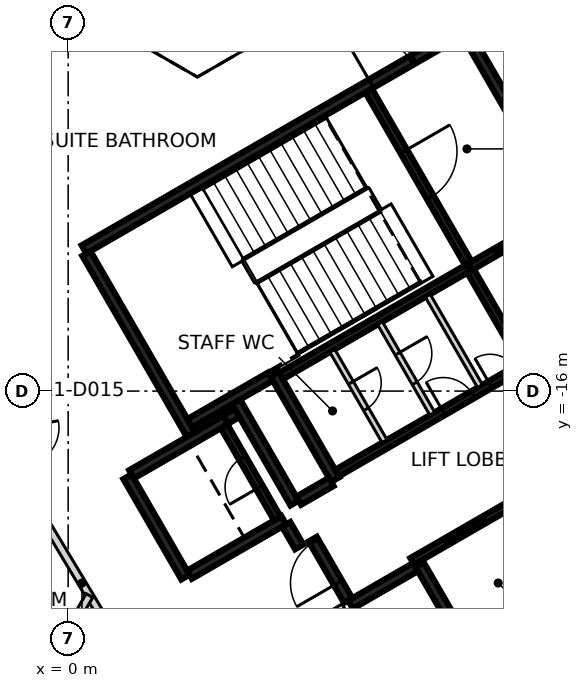
"""IFC4 building model, lengths in metres.
Left out: names, types, materials, properties, quantities, classifications, styles, units other than length and angle.
Written with IfcOpenShell. Run it as: python <this file> out.ifc"""

import sys

from ifc_helpers import new_model, si_unit, direction, frame, frame_2d, origin, place, context, subcontext, project, spatial, rectangle, extrude, element, fill, save


model = new_model("IFC4")
c1 = context("Model", 3, precision=1e-05, world=origin(), true_north=direction((0.0, 1.0)))
c2 = subcontext(c1, "Body", "Model", "MODEL_VIEW")
j1 = project(units=[si_unit("LENGTHUNIT", "METRE"), si_unit("PLANEANGLEUNIT", "RADIAN")], contexts=[c1])
p1 = place(None, origin())
s1 = spatial("IfcSite", under=j1, at=p1, CompositionType="ELEMENT")
p2 = place(p1, origin())
s2 = spatial("IfcBuilding", under=s1, at=p2, CompositionType="ELEMENT")
p3 = place(p2, frame((0.0, 0.0, 53.0)))
s3 = spatial("IfcBuildingStorey", under=s2, at=p3, CompositionType="ELEMENT", Elevation=53.0)
p4 = place(p3, frame((0.417, -12.273, 0.0), z_axis=(0.0, 0.0, 1.0), x_axis=(0.866021906294, 0.500006057782, 0.0)))
e1 = element("IfcWall", 1, at=p4, inside=s3, PredefinedType="SHEAR", context=c2, shape_type="SweptSolid", body=[
    extrude(rectangle(XDim=11.55, YDim=0.25, at=frame_2d((5.775, 0.0))), origin(), (0.0, 0.0, 1.0), 3.125),
])
p5 = place(p4, frame((10.025, 0.0, 0.0)))
e2 = element("IfcOpeningElement", 2, at=p5, cuts=e1, PredefinedType="OPENING", context=c2, shape_type="SweptSolid", body=[
    extrude(rectangle(XDim=1.2, YDim=2.1, at=frame_2d((0.6, 1.05))), frame((0.0, 0.135, 0.0), z_axis=(0.0, -1.0, 0.0), x_axis=(1.0, 0.0, 0.0)), (0.0, 0.0, 1.0), 0.27),
])
p6 = place(p4, frame((8.725, 0.0, 0.0)))
e3 = element("IfcOpeningElement", 3, at=p6, cuts=e1, PredefinedType="OPENING", context=c2, shape_type="SweptSolid", body=[
    extrude(rectangle(XDim=1.2, YDim=2.1, at=frame_2d((0.6, 1.05))), frame((0.0, 0.135, 0.0), z_axis=(0.0, -1.0, 0.0), x_axis=(1.0, 0.0, 0.0)), (0.0, 0.0, 1.0), 0.27),
])
p7 = place(p3, frame((15.865, -20.328, 0.0), z_axis=(0.0, 0.0, 1.0), x_axis=(-0.86602852612, -0.499994591916, 0.0)))
e4 = element("IfcWall", 4, at=p7, inside=s3, PredefinedType="SHEAR", context=c2, shape_type="SweptSolid", body=[
    extrude(rectangle(XDim=5.85, YDim=0.25, at=frame_2d((2.925, 0.0))), origin(), (0.0, 0.0, 1.0), 3.125),
])
p8 = place(p3, frame((3.235, -17.153, 0.0), z_axis=(0.0, 0.0, 1.0), x_axis=(-0.500008851346, 0.866020293397, 0.0)))
e5 = element("IfcWall", 5, at=p8, inside=s3, PredefinedType="SHEAR", context=c2, shape_type="SweptSolid", body=[
    extrude(rectangle(XDim=5.51, YDim=0.25, at=frame_2d((2.755, 0.0))), origin(), (0.0, 0.0, 1.0), 3.125),
])
p9 = place(p3, frame((10.483, -6.606, 0.0), z_axis=(0.0, 0.0, 1.0), x_axis=(0.49999885962, -0.866026062182, 0.0)))
e6 = element("IfcWall", 6, at=p9, inside=s3, PredefinedType="SHEAR", context=c2, shape_type="SweptSolid", body=[
    extrude(rectangle(XDim=5.225, YDim=0.25, at=frame_2d((2.612, 0.0))), origin(), (0.0, 0.0, 1.0), 3.125),
])
p10 = place(p9, frame((1.95, 0.0, 0.0)))
e7 = element("IfcOpeningElement", 7, at=p10, cuts=e6, PredefinedType="OPENING", context=c2, shape_type="SweptSolid", body=[
    extrude(rectangle(XDim=1.2, YDim=2.1, at=frame_2d((0.6, 1.05))), frame((0.0, 0.135, 0.0), z_axis=(0.0, -1.0, 0.0), x_axis=(1.0, 0.0, 0.0)), (0.0, 0.0, 1.0), 0.27),
])
p11 = place(p3, frame((7.031, -18.327, 0.0), z_axis=(0.0, 0.0, 1.0), x_axis=(-0.499971222258, 0.866042017984, 0.0)))
e8 = element("IfcWall", 8, at=p11, inside=s3, PredefinedType="SHEAR", context=c2, shape_type="SweptSolid", body=[
    extrude(rectangle(XDim=3.2, YDim=0.25, at=frame_2d((1.6, 0.0))), origin(), (0.0, 0.0, 1.0), 3.125),
])
p12 = place(p3, frame((10.736, -23.145, 0.0), z_axis=(0.0, 0.0, 1.0), x_axis=(-0.500023226632, 0.866011993467, 0.0)))
e9 = element("IfcWall", 9, at=p12, inside=s3, PredefinedType="SHEAR", context=c2, shape_type="SweptSolid", body=[
    extrude(rectangle(XDim=2.974, YDim=0.25, at=frame_2d((1.487, 0.0))), origin(), (0.0, 0.0, 1.0), 3.125),
])
p13 = place(p3, frame((3.085, -20.894, 0.0), z_axis=(0.0, 0.0, 1.0), x_axis=(-0.499978833458, 0.866037623948, 0.0)))
e10 = element("IfcWall", 10, at=p13, inside=s3, PredefinedType="SHEAR", context=c2, shape_type="SweptSolid", body=[
    extrude(rectangle(XDim=3.05, YDim=0.25, at=frame_2d((1.525, 0.0))), origin(), (0.0, 0.0, 1.0), 3.125),
])
p14 = place(p3, frame((1.669, -18.19, 0.0), z_axis=(0.0, 0.0, 1.0), x_axis=(0.866042235819, 0.499970844928, 0.0)))
e11 = element("IfcWall", 11, at=p14, inside=s3, PredefinedType="SHEAR", context=c2, shape_type="SweptSolid", body=[
    extrude(rectangle(XDim=2.865, YDim=0.25, at=frame_2d((1.432, 0.0))), origin(), (0.0, 0.0, 1.0), 3.125),
])
p15 = place(p3, frame((5.675, -19.399, 0.0), z_axis=(0.0, 0.0, 1.0), x_axis=(-0.866026637627, -0.499997862916, 0.0)))
e12 = element("IfcWall", 12, at=p15, inside=s3, PredefinedType="SHEAR", context=c2, shape_type="SweptSolid", body=[
    extrude(rectangle(XDim=2.865, YDim=0.25, at=frame_2d((1.432, 0.0))), origin(), (0.0, 0.0, 1.0), 3.125),
])
p16 = place(p3, frame((4.414, -16.276, 0.0), z_axis=(0.0, 0.0, 1.0), x_axis=(0.500003324108, -0.866023484601, 0.0)))
e13 = element("IfcWall", 13, at=p16, inside=s3, PredefinedType="SHEAR", context=c2, shape_type="SweptSolid", body=[
    extrude(rectangle(XDim=3.085, YDim=0.25, at=frame_2d((1.542, 0.0))), origin(), (0.0, 0.0, 1.0), 3.125),
])
p17 = place(p3, frame((5.322, -15.619, 0.0), z_axis=(0.0, 0.0, 1.0), x_axis=(-0.866026229868, -0.499998569178, 0.0)))
e14 = element("IfcWall", 14, at=p17, inside=s3, PredefinedType="SHEAR", context=c2, shape_type="SweptSolid", body=[
    extrude(rectangle(XDim=2.449, YDim=0.25, at=frame_2d((1.225, 0.0))), origin(), (0.0, 0.0, 1.0), 3.125),
])
p18 = place(p3, frame((9.14, -20.631, 0.0), z_axis=(0.0, 0.0, 1.0), x_axis=(-0.866043531843, -0.499968599967, 0.0)))
e15 = element("IfcWall", 15, at=p18, inside=s3, PredefinedType="SHEAR", context=c2, shape_type="SweptSolid", body=[
    extrude(rectangle(XDim=1.975, YDim=0.25, at=frame_2d((0.987, 0.0))), origin(), (0.0, 0.0, 1.0), 3.125),
])
p19 = place(p3, frame((7.367, -21.51, 0.0), z_axis=(0.0, 0.0, 1.0), x_axis=(-0.499983108224, 0.866035156036, 0.0)))
e16 = element("IfcWall", 16, at=p19, inside=s3, PredefinedType="SHEAR", context=c2, shape_type="SweptSolid", body=[
    extrude(rectangle(XDim=1.865, YDim=0.25, at=frame_2d((0.932, 0.0))), origin(), (0.0, 0.0, 1.0), 3.125),
])
p20 = place(p19, frame((0.535, 0.0, 0.0)))
e17 = element("IfcOpeningElement", 17, at=p20, cuts=e16, PredefinedType="OPENING", context=c2, shape_type="SweptSolid", body=[
    extrude(rectangle(XDim=1.25, YDim=2.1, at=frame_2d((0.625, 1.05))), frame((0.0, 0.135, 0.0), z_axis=(0.0, -1.0, 0.0), x_axis=(1.0, 0.0, 0.0)), (0.0, 0.0, 1.0), 0.27),
])
p21 = place(p3, frame((6.065, -18.885, 0.0), z_axis=(0.0, 0.0, 1.0), x_axis=(0.866017078145, 0.500014420154, 0.0)))
e18 = element("IfcWall", 18, at=p21, inside=s3, PredefinedType="SHEAR", context=c2, shape_type="SweptSolid", body=[
    extrude(rectangle(XDim=0.989, YDim=0.25, at=frame_2d((0.495, 0.0))), origin(), (0.0, 0.0, 1.0), 3.125),
])
p22 = place(p3, frame((6.08, -20.1, 0.0), z_axis=(0.0, 0.0, 1.0), x_axis=(-0.500051773299, 0.865995510393, 0.0)))
e19 = element("IfcWall", 19, at=p22, inside=s3, PredefinedType="SHEAR", context=c2, shape_type="SweptSolid", body=[
    extrude(rectangle(XDim=0.685, YDim=0.25, at=frame_2d((0.342, 0.0))), origin(), (0.0, 0.0, 1.0), 3.125),
])
p23 = place(p3, frame((4.145, -16.749, 0.0), z_axis=(0.0, 0.0, 1.0), x_axis=(0.866185586049, 0.49972245349, 0.0)))
e20 = element("IfcWall", 20, at=p23, inside=s3, PredefinedType="SHEAR", context=c2, shape_type="SweptSolid", body=[
    extrude(rectangle(XDim=0.344, YDim=0.25, at=frame_2d((0.172, 0.0))), origin(), (0.0, 0.0, 1.0), 3.125),
])
p24 = place(p3, frame((9.052, -20.48, 0.0), z_axis=(0.0, 0.0, 1.0), x_axis=(0.866030299012, 0.499991521122, 0.0)))
e21 = element("IfcWall", 21, at=p24, inside=s3, PredefinedType="SHEAR", context=c2, shape_type="SweptSolid", body=[
    extrude(rectangle(XDim=6.1, YDim=0.2, at=frame_2d((3.05, 0.0))), origin(), (0.0, 0.0, 1.0), 3.125),
])
p25 = place(p24, frame((1.0, 0.0, 0.0)))
e22 = element("IfcOpeningElement", 22, at=p25, cuts=e21, PredefinedType="OPENING", context=c2, shape_type="SweptSolid", body=[
    extrude(rectangle(XDim=1.2, YDim=2.1, at=frame_2d((0.6, 1.05))), frame((0.0, 0.11, 0.0), z_axis=(0.0, -1.0, 0.0), x_axis=(1.0, 0.0, 0.0)), (0.0, 0.0, 1.0), 0.22),
])
p26 = place(p24, frame((4.05, 0.0, 0.0)))
e23 = element("IfcOpeningElement", 23, at=p26, cuts=e21, PredefinedType="OPENING", context=c2, shape_type="SweptSolid", body=[
    extrude(rectangle(XDim=1.2, YDim=2.1, at=frame_2d((0.6, 1.05))), frame((0.0, 0.11, 0.0), z_axis=(0.0, -1.0, 0.0), x_axis=(1.0, 0.0, 0.0)), (0.0, 0.0, 1.0), 0.22),
])
p27 = place(p3, frame((10.538, -12.752, 0.0), z_axis=(0.0, 0.0, 1.0), x_axis=(-0.866038630372, -0.499977090179, 0.0)))
e24 = element("IfcWall", 24, at=p27, inside=s3, PredefinedType="SHEAR", context=c2, shape_type="SweptSolid", body=[
    extrude(rectangle(XDim=5.699, YDim=0.2, at=frame_2d((2.85, 0.0))), origin(), (0.0, 0.0, 1.0), 3.125),
])
p28 = place(p3, frame((7.077, -18.156, 0.0), z_axis=(0.0, 0.0, 1.0), x_axis=(0.866038630372, 0.499977090179, 0.0)))
e25 = element("IfcWall", 25, at=p28, inside=s3, PredefinedType="SHEAR", context=c2, shape_type="SweptSolid", body=[
    extrude(rectangle(XDim=5.699, YDim=0.2, at=frame_2d((2.85, 0.0))), origin(), (0.0, 0.0, 1.0), 3.125),
])
p29 = place(p28, frame((3.224, 0.0, 0.0)))
e26 = element("IfcOpeningElement", 26, at=p29, cuts=e25, PredefinedType="OPENING", context=c2, shape_type="SweptSolid", body=[
    extrude(rectangle(XDim=0.9, YDim=2.1, at=frame_2d((0.45, 1.05))), frame((0.0, 0.11, 0.0), z_axis=(0.0, -1.0, 0.0), x_axis=(1.0, 0.0, 0.0)), (0.0, 0.0, 1.0), 0.22),
])
p30 = place(p28, frame((4.649, 0.0, 0.0)))
e27 = element("IfcOpeningElement", 27, at=p30, cuts=e25, PredefinedType="OPENING", context=c2, shape_type="SweptSolid", body=[
    extrude(rectangle(XDim=0.8, YDim=2.1, at=frame_2d((0.4, 1.05))), frame((0.0, 0.11, 0.0), z_axis=(0.0, -1.0, 0.0), x_axis=(1.0, 0.0, 0.0)), (0.0, 0.0, 1.0), 0.22),
])
p31 = place(p3, frame((7.906, -8.094, 0.0), z_axis=(0.0, 0.0, 1.0), x_axis=(0.500024287448, -0.866011380966, 0.0)))
e28 = element("IfcWall", 28, at=p31, inside=s3, PredefinedType="SHEAR", context=c2, shape_type="SweptSolid", body=[
    extrude(rectangle(XDim=5.251, YDim=0.2, at=frame_2d((2.625, 0.0))), origin(), (0.0, 0.0, 1.0), 3.125),
])
p32 = place(p31, frame((1.849, 0.0, 0.0)))
e29 = element("IfcOpeningElement", 29, at=p32, cuts=e28, PredefinedType="OPENING", context=c2, shape_type="SweptSolid", body=[
    extrude(rectangle(XDim=1.4, YDim=2.1, at=frame_2d((0.7, 1.05))), frame((0.0, 0.11, 0.0), z_axis=(0.0, -1.0, 0.0), x_axis=(1.0, 0.0, 0.0)), (0.0, 0.0, 1.0), 0.22),
])
p33 = place(p3, frame((5.503, -19.352, 0.0), z_axis=(0.0, 0.0, 1.0), x_axis=(-0.499986818241, 0.866033014143, 0.0)))
e30 = element("IfcWall", 30, at=p33, inside=s3, PredefinedType="SHEAR", context=c2, shape_type="SweptSolid", body=[
    extrude(rectangle(XDim=2.798, YDim=0.2, at=frame_2d((1.399, 0.0))), origin(), (0.0, 0.0, 1.0), 3.125),
])
p34 = place(p33, frame((0.949, 0.0, 0.0)))
e31 = element("IfcOpeningElement", 31, at=p34, cuts=e30, PredefinedType="OPENING", context=c2, shape_type="SweptSolid", body=[
    extrude(rectangle(XDim=0.9, YDim=2.1, at=frame_2d((0.45, 1.05))), frame((0.0, 0.11, 0.0), z_axis=(0.0, -1.0, 0.0), x_axis=(1.0, 0.0, 0.0)), (0.0, 0.0, 1.0), 0.22),
])
p35 = place(p3, frame((11.963, -15.22, 0.0), z_axis=(0.0, 0.0, 1.0), x_axis=(-0.500034990121, 0.866005201286, 0.0)))
e32 = element("IfcWall", 32, at=p35, inside=s3, PredefinedType="SHEAR", context=c2, shape_type="SweptSolid", body=[
    extrude(rectangle(XDim=2.75, YDim=0.2, at=frame_2d((1.375, 0.0))), origin(), (0.0, 0.0, 1.0), 3.125),
])
p36 = place(p3, frame((10.587, -12.723, 0.0), z_axis=(0.0, 0.0, 1.0), x_axis=(0.866037306777, 0.499979382845, 0.0)))
e33 = element("IfcWall", 33, at=p36, inside=s3, PredefinedType="SHEAR", context=c2, shape_type="SweptSolid", body=[
    extrude(rectangle(XDim=2.742, YDim=0.2, at=frame_2d((1.371, 0.0))), origin(), (0.0, 0.0, 1.0), 3.125),
])
p37 = place(p36, frame((0.743, 0.0, 0.0)))
e34 = element("IfcOpeningElement", 34, at=p37, cuts=e33, PredefinedType="OPENING", context=c2, shape_type="SweptSolid", body=[
    extrude(rectangle(XDim=1.3, YDim=2.1, at=frame_2d((0.65, 1.05))), frame((0.0, 0.11, 0.0), z_axis=(0.0, -1.0, 0.0), x_axis=(1.0, 0.0, 0.0)), (0.0, 0.0, 1.0), 0.22),
])
p38 = place(p3, frame((8.207, -14.214, 0.0), z_axis=(0.0, 0.0, 1.0), x_axis=(0.50002746344, -0.86600954718, 0.0)))
e35 = element("IfcWall", 35, at=p38, inside=s3, PredefinedType="PARTITIONING", context=c2, shape_type="SweptSolid", body=[
    extrude(rectangle(XDim=2.748, YDim=0.15, at=frame_2d((1.374, 0.0))), origin(), (0.0, 0.0, 1.0), 3.125),
])
p39 = place(p38, frame((0.924, 0.0, 0.0)))
e36 = element("IfcOpeningElement", 36, at=p39, cuts=e35, PredefinedType="OPENING", context=c2, shape_type="SweptSolid", body=[
    extrude(rectangle(XDim=0.9, YDim=2.1, at=frame_2d((0.45, 1.05))), frame((0.0, 0.085, 0.0), z_axis=(0.0, -1.0, 0.0), x_axis=(1.0, 0.0, 0.0)), (0.0, 0.0, 1.0), 0.17),
])
p40 = place(p3, frame((9.462, -13.489, 0.0), z_axis=(0.0, 0.0, 1.0), x_axis=(0.499988999718, -0.866031754707, 0.0)))
e37 = element("IfcWall", 37, at=p40, inside=s3, PredefinedType="PARTITIONING", context=c2, shape_type="SweptSolid", body=[
    extrude(rectangle(XDim=2.749, YDim=0.15, at=frame_2d((1.374, 0.0))), origin(), (0.0, 0.0, 1.0), 3.125),
])
p41 = place(p3, frame((6.951, -14.939, 0.0), z_axis=(0.0, 0.0, 1.0), x_axis=(0.499988999718, -0.866031754707, 0.0)))
e38 = element("IfcWall", 38, at=p41, inside=s3, PredefinedType="PARTITIONING", context=c2, shape_type="SweptSolid", body=[
    extrude(rectangle(XDim=2.749, YDim=0.15, at=frame_2d((1.374, 0.0))), origin(), (0.0, 0.0, 1.0), 3.125),
])
p42 = place(p41, frame((0.974, 0.0, 0.0)))
e39 = element("IfcOpeningElement", 39, at=p42, cuts=e38, PredefinedType="OPENING", context=c2, shape_type="SweptSolid", body=[
    extrude(rectangle(XDim=0.8, YDim=2.1, at=frame_2d((0.4, 1.05))), frame((0.0, 0.085, 0.0), z_axis=(0.0, -1.0, 0.0), x_axis=(1.0, 0.0, 0.0)), (0.0, 0.0, 1.0), 0.17),
])
p43 = place(p3, frame((-0.858, -19.017, 0.0), z_axis=(0.0, 0.0, 1.0), x_axis=(0.514647068805, -0.857402119528, 0.0)))
e40 = element("IfcWall", 40, at=p43, inside=s3, PredefinedType="PARTITIONING", context=c2, shape_type="SweptSolid", body=[
    extrude(rectangle(XDim=4.745, YDim=0.2, at=frame_2d((2.373, 0.0))), origin(), (0.0, 0.0, 1.0), 3.125),
])
p44 = place(p3, frame((6.054, -22.385, 0.0), z_axis=(0.0, 0.0, 1.0), x_axis=(0.86593101922, 0.500163443238, 0.0)))
e41 = element("IfcWall", 41, at=p44, inside=s3, PredefinedType="PARTITIONING", context=c2, shape_type="SweptSolid", body=[
    extrude(rectangle(XDim=1.39, YDim=0.2, at=frame_2d((0.695, 0.0))), origin(), (0.0, 0.0, 1.0), 3.125),
])
p45 = place(p3, frame((-2.462, -26.615, 0.0), z_axis=(0.0, 0.0, 1.0), x_axis=(0.49992636536, 0.86606791259, 0.0)))
e42 = element("IfcWall", 42, at=p45, inside=s3, PredefinedType="PARTITIONING", context=c2, shape_type="SweptSolid", body=[
    extrude(rectangle(XDim=6.046, YDim=0.2, at=frame_2d((3.023, 0.0))), origin(), (0.0, 0.0, 1.0), 3.125),
])
p46 = place(p37, origin())
e43 = element("IfcDoor", 43, at=p46, inside=s3, OperationType="SLIDING_TO_RIGHT", PredefinedType="DOOR", context=c2, shape_type="SweptSolid", body=[
    extrude(rectangle(XDim=1.3, YDim=2.1, at=frame_2d((0.65, 1.05))), frame((0.0, 0.025, 0.0), z_axis=(0.0, -1.0, 0.0), x_axis=(1.0, 0.0, 0.0)), (0.0, 0.0, 1.0), 0.05),
])
fill(e34, e43)
p47 = place(p25, origin())
e44 = element("IfcDoor", 44, at=p47, inside=s3, OperationType="DOUBLE_DOOR_SLIDING", PredefinedType="DOOR", context=c2, shape_type="SweptSolid", body=[
    extrude(rectangle(XDim=1.2, YDim=2.1, at=frame_2d((0.6, 1.05))), frame((0.0, 0.025, 0.0), z_axis=(0.0, -1.0, 0.0), x_axis=(1.0, 0.0, 0.0)), (0.0, 0.0, 1.0), 0.05),
])
fill(e22, e44)
p48 = place(p20, origin())
e45 = element("IfcDoor", 45, at=p48, inside=s3, OperationType="SINGLE_SWING_LEFT", PredefinedType="DOOR", context=c2, shape_type="SweptSolid", body=[
    extrude(rectangle(XDim=1.25, YDim=2.1, at=frame_2d((0.625, 1.05))), frame((0.0, 0.025, 0.0), z_axis=(0.0, -1.0, 0.0), x_axis=(1.0, 0.0, 0.0)), (0.0, 0.0, 1.0), 0.05),
])
fill(e17, e45)
p49 = place(p5, origin())
e46 = element("IfcDoor", 46, at=p49, inside=s3, OperationType="SINGLE_SWING_LEFT", PredefinedType="DOOR", context=c2, shape_type="SweptSolid", body=[
    extrude(rectangle(XDim=1.2, YDim=2.1, at=frame_2d((0.6, 1.05))), frame((0.0, 0.025, 0.0), z_axis=(0.0, -1.0, 0.0), x_axis=(1.0, 0.0, 0.0)), (0.0, 0.0, 1.0), 0.05),
])
fill(e2, e46)
p50 = place(p6, origin())
e47 = element("IfcDoor", 47, at=p50, inside=s3, OperationType="SINGLE_SWING_RIGHT", PredefinedType="DOOR", context=c2, shape_type="SweptSolid", body=[
    extrude(rectangle(XDim=1.2, YDim=2.1, at=frame_2d((0.6, 1.05))), frame((0.0, 0.025, 0.0), z_axis=(0.0, -1.0, 0.0), x_axis=(1.0, 0.0, 0.0)), (0.0, 0.0, 1.0), 0.05),
])
fill(e3, e47)
p51 = place(p32, origin())
e48 = element("IfcDoor", 48, at=p51, inside=s3, OperationType="SINGLE_SWING_RIGHT", PredefinedType="DOOR", context=c2, shape_type="SweptSolid", body=[
    extrude(rectangle(XDim=1.4, YDim=2.1, at=frame_2d((0.7, 1.05))), frame((0.0, 0.025, 0.0), z_axis=(0.0, -1.0, 0.0), x_axis=(1.0, 0.0, 0.0)), (0.0, 0.0, 1.0), 0.05),
])
fill(e29, e48)
p52 = place(p29, origin())
e49 = element("IfcDoor", 49, at=p52, inside=s3, OperationType="SINGLE_SWING_LEFT", PredefinedType="DOOR", context=c2, shape_type="SweptSolid", body=[
    extrude(rectangle(XDim=0.9, YDim=2.1, at=frame_2d((0.45, 1.05))), frame((0.0, 0.025, 0.0), z_axis=(0.0, -1.0, 0.0), x_axis=(1.0, 0.0, 0.0)), (0.0, 0.0, 1.0), 0.05),
])
fill(e26, e49)
p53 = place(p30, origin())
e50 = element("IfcDoor", 50, at=p53, inside=s3, OperationType="SINGLE_SWING_RIGHT", PredefinedType="DOOR", context=c2, shape_type="SweptSolid", body=[
    extrude(rectangle(XDim=0.8, YDim=2.1, at=frame_2d((0.4, 1.05))), frame((0.0, 0.025, 0.0), z_axis=(0.0, -1.0, 0.0), x_axis=(1.0, 0.0, 0.0)), (0.0, 0.0, 1.0), 0.05),
])
fill(e27, e50)
p54 = place(p34, origin())
e51 = element("IfcDoor", 51, at=p54, inside=s3, OperationType="SINGLE_SWING_LEFT", PredefinedType="DOOR", context=c2, shape_type="SweptSolid", body=[
    extrude(rectangle(XDim=0.9, YDim=2.1, at=frame_2d((0.45, 1.05))), frame((0.0, 0.025, 0.0), z_axis=(0.0, -1.0, 0.0), x_axis=(1.0, 0.0, 0.0)), (0.0, 0.0, 1.0), 0.05),
])
fill(e31, e51)
p55 = place(p39, origin())
e52 = element("IfcDoor", 52, at=p55, inside=s3, OperationType="SINGLE_SWING_RIGHT", PredefinedType="DOOR", context=c2, shape_type="SweptSolid", body=[
    extrude(rectangle(XDim=0.9, YDim=2.1, at=frame_2d((0.45, 1.05))), frame((0.0, 0.025, 0.0), z_axis=(0.0, -1.0, 0.0), x_axis=(1.0, 0.0, 0.0)), (0.0, 0.0, 1.0), 0.05),
])
fill(e36, e52)
p56 = place(p42, origin())
e53 = element("IfcDoor", 53, at=p56, inside=s3, OperationType="SINGLE_SWING_LEFT", PredefinedType="DOOR", context=c2, shape_type="SweptSolid", body=[
    extrude(rectangle(XDim=0.8, YDim=2.1, at=frame_2d((0.4, 1.05))), frame((0.0, 0.025, 0.0), z_axis=(0.0, -1.0, 0.0), x_axis=(1.0, 0.0, 0.0)), (0.0, 0.0, 1.0), 0.05),
])
fill(e39, e53)
p57 = place(p10, origin())
e54 = element("IfcDoor", 54, at=p57, inside=s3, OperationType="SINGLE_SWING_LEFT", PredefinedType="DOOR", context=c2, shape_type="SweptSolid", body=[
    extrude(rectangle(XDim=1.2, YDim=2.1, at=frame_2d((0.6, 1.05))), frame((0.0, 0.025, 0.0), z_axis=(0.0, -1.0, 0.0), x_axis=(1.0, 0.0, 0.0)), (0.0, 0.0, 1.0), 0.05),
])
fill(e7, e54)
save(model, sys.argv[1])
